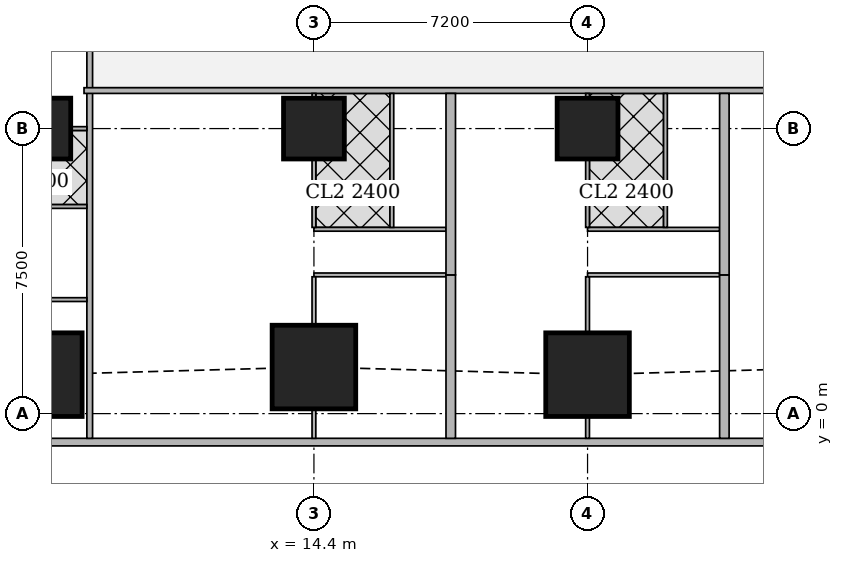
"""IFC4 building model, lengths in metres.
Left out: names, types, materials, properties, quantities, classifications, styles, units other than length and angle.
Written with IfcOpenShell. Run it as: python <this file> out.ifc"""

import sys

from ifc_helpers import new_model, si_unit, direction, frame, frame_2d, origin, origin_2d, place, context, subcontext, project, spatial, rectangle, extrude, element, fill, save


model = new_model("IFC4")
c1 = context("Model", 3, precision=1e-05, world=origin(), true_north=direction((0.0, 1.0)))
c2 = subcontext(c1, "Body", "Model", "MODEL_VIEW")
j1 = project(units=[si_unit("LENGTHUNIT", "METRE"), si_unit("PLANEANGLEUNIT", "RADIAN")], contexts=[c1])
p1 = place(None, origin())
s1 = spatial("IfcSite", under=j1, at=p1, CompositionType="ELEMENT")
p2 = place(p1, origin())
s2 = spatial("IfcBuilding", under=s1, at=p2, CompositionType="ELEMENT")
p3 = place(p2, frame((0.0, 0.0, 89.15)))
s3 = spatial("IfcBuildingStorey", under=s2, at=p3, CompositionType="ELEMENT", Elevation=89.15)
for number, where, z_axis, x_axis in (
    (1, (7.2, 1.025, 0.0), (0.0, 0.0, 1.0), (1.0, 0.0, 0.0)),
    (2, (14.4, 1.225, 0.0), (0.0, 0.0, 1.0), (1.0, 0.0, 0.0)),
    (3, (21.6, 1.025, 0.0), (0.0, 0.0, 1.0), (1.0, 0.0, 0.0)),
):
    element("IfcColumn", number, at=place(p3, frame(where, z_axis=z_axis, x_axis=x_axis)), inside=s3, PredefinedType="COLUMN", context=c2, shape_type="SweptSolid", body=[
        extrude(rectangle(XDim=2.2, YDim=2.2, at=origin_2d()), origin(), (0.0, 0.0, 1.0), 3.75),
    ])
for number, where, z_axis, x_axis in (
    (4, (7.2, 7.5, 0.0), (0.0, 0.0, 1.0), (1.0, 0.0, 0.0)),
    (5, (14.4, 7.5, 0.0), (0.0, 0.0, 1.0), (1.0, 0.0, 0.0)),
    (6, (21.6, 7.5, 0.0), (0.0, 0.0, 1.0), (1.0, 0.0, 0.0)),
):
    element("IfcColumn", number, at=place(p3, frame(where, z_axis=z_axis, x_axis=x_axis)), inside=s3, PredefinedType="COLUMN", context=c2, shape_type="SweptSolid", body=[
        extrude(rectangle(XDim=1.6, YDim=1.6, at=origin_2d()), origin(), (0.0, 0.0, 1.0), 3.75),
    ])
p4 = place(p3, frame((2.163, -0.75, 0.0), z_axis=(0.0, 0.0, 1.0), x_axis=(1.0, 0.0, 0.0)))
e7 = element("IfcWall", 7, at=p4, inside=s3, PredefinedType="SOLIDWALL", context=c2, shape_type="SweptSolid", body=[
    extrude(rectangle(XDim=45.628, YDim=0.2, at=frame_2d((22.814, 0.0))), origin(), (0.0, 0.0, 1.0), 3.5),
])
p5 = place(p4, frame((9.537, 0.0, 0.9)))
e8 = element("IfcOpeningElement", 8, at=p5, cuts=e7, PredefinedType="OPENING", context=c2, shape_type="SweptSolid", body=[
    extrude(rectangle(XDim=1.8, YDim=1.5, at=frame_2d((0.9, 0.75))), frame((0.0, 0.11, 0.0), z_axis=(0.0, -1.0, 0.0), x_axis=(1.0, 0.0, 0.0)), (0.0, 0.0, 1.0), 0.22),
])
p6 = place(p4, frame((13.137, 0.0, 0.9)))
e9 = element("IfcOpeningElement", 9, at=p6, cuts=e7, PredefinedType="OPENING", context=c2, shape_type="SweptSolid", body=[
    extrude(rectangle(XDim=1.8, YDim=1.5, at=frame_2d((0.9, 0.75))), frame((0.0, 0.11, 0.0), z_axis=(0.0, -1.0, 0.0), x_axis=(1.0, 0.0, 0.0)), (0.0, 0.0, 1.0), 0.22),
])
p7 = place(p4, frame((16.737, 0.0, 0.9)))
e10 = element("IfcOpeningElement", 10, at=p7, cuts=e7, PredefinedType="OPENING", context=c2, shape_type="SweptSolid", body=[
    extrude(rectangle(XDim=1.8, YDim=1.5, at=frame_2d((0.9, 0.75))), frame((0.0, 0.11, 0.0), z_axis=(0.0, -1.0, 0.0), x_axis=(1.0, 0.0, 0.0)), (0.0, 0.0, 1.0), 0.22),
])
p8 = place(p4, frame((20.337, 0.0, 0.9)))
e11 = element("IfcOpeningElement", 11, at=p8, cuts=e7, PredefinedType="OPENING", context=c2, shape_type="SweptSolid", body=[
    extrude(rectangle(XDim=1.8, YDim=1.5, at=frame_2d((0.9, 0.75))), frame((0.0, 0.11, 0.0), z_axis=(0.0, -1.0, 0.0), x_axis=(1.0, 0.0, 0.0)), (0.0, 0.0, 1.0), 0.22),
])
p9 = place(p4, frame((23.937, 0.0, 0.9)))
e12 = element("IfcOpeningElement", 12, at=p9, cuts=e7, PredefinedType="OPENING", context=c2, shape_type="SweptSolid", body=[
    extrude(rectangle(XDim=1.8, YDim=1.5, at=frame_2d((0.9, 0.75))), frame((0.0, 0.11, 0.0), z_axis=(0.0, -1.0, 0.0), x_axis=(1.0, 0.0, 0.0)), (0.0, 0.0, 1.0), 0.22),
])
p10 = place(p4, frame((27.537, 0.0, 0.9)))
e13 = element("IfcOpeningElement", 13, at=p10, cuts=e7, PredefinedType="OPENING", context=c2, shape_type="SweptSolid", body=[
    extrude(rectangle(XDim=1.8, YDim=1.5, at=frame_2d((0.9, 0.75))), frame((0.0, 0.11, 0.0), z_axis=(0.0, -1.0, 0.0), x_axis=(1.0, 0.0, 0.0)), (0.0, 0.0, 1.0), 0.22),
])
p11 = place(p4, frame((31.137, 0.0, 0.9)))
e14 = element("IfcOpeningElement", 14, at=p11, cuts=e7, PredefinedType="OPENING", context=c2, shape_type="SweptSolid", body=[
    extrude(rectangle(XDim=1.8, YDim=1.5, at=frame_2d((0.9, 0.75))), frame((0.0, 0.11, 0.0), z_axis=(0.0, -1.0, 0.0), x_axis=(1.0, 0.0, 0.0)), (0.0, 0.0, 1.0), 0.22),
])
p12 = place(p4, frame((34.737, 0.0, 0.9)))
e15 = element("IfcOpeningElement", 15, at=p12, cuts=e7, PredefinedType="OPENING", context=c2, shape_type="SweptSolid", body=[
    extrude(rectangle(XDim=1.8, YDim=1.5, at=frame_2d((0.9, 0.75))), frame((0.0, 0.11, 0.0), z_axis=(0.0, -1.0, 0.0), x_axis=(1.0, 0.0, 0.0)), (0.0, 0.0, 1.0), 0.22),
])
p13 = place(p3, frame((8.5, -0.65, 0.0), z_axis=(0.0, 0.0, 1.0), x_axis=(0.0, 1.0, 0.0)))
e16 = element("IfcWall", 16, at=p13, inside=s3, PredefinedType="SOLIDWALL", context=c2, shape_type="SweptSolid", body=[
    extrude(rectangle(XDim=46.3, YDim=0.15, at=frame_2d((23.15, 0.0))), origin(), (0.0, 0.0, 1.0), 2.2),
])
p14 = place(p13, frame((9.525, 0.0, 0.0)))
e17 = element("IfcOpeningElement", 17, at=p14, cuts=e16, PredefinedType="OPENING", context=c2, shape_type="SweptSolid", body=[
    extrude(rectangle(XDim=1.0, YDim=2.1, at=frame_2d((0.5, 1.05))), frame((0.0, 0.085, 0.0), z_axis=(0.0, -1.0, 0.0), x_axis=(1.0, 0.0, 0.0)), (0.0, 0.0, 1.0), 0.17),
])
p15 = place(p13, frame((13.275, 0.0, 0.0)))
e18 = element("IfcOpeningElement", 18, at=p15, cuts=e16, PredefinedType="OPENING", context=c2, shape_type="SweptSolid", body=[
    extrude(rectangle(XDim=1.0, YDim=2.1, at=frame_2d((0.5, 1.05))), frame((0.0, 0.085, 0.0), z_axis=(0.0, -1.0, 0.0), x_axis=(1.0, 0.0, 0.0)), (0.0, 0.0, 1.0), 0.17),
])
p16 = place(p13, frame((20.775, 0.0, 0.0)))
e19 = element("IfcOpeningElement", 19, at=p16, cuts=e16, PredefinedType="OPENING", context=c2, shape_type="SweptSolid", body=[
    extrude(rectangle(XDim=1.0, YDim=2.1, at=frame_2d((0.5, 1.05))), frame((0.0, 0.085, 0.0), z_axis=(0.0, -1.0, 0.0), x_axis=(1.0, 0.0, 0.0)), (0.0, 0.0, 1.0), 0.17),
])
p17 = place(p13, frame((32.025, 0.0, 0.0)))
e20 = element("IfcOpeningElement", 20, at=p17, cuts=e16, PredefinedType="OPENING", context=c2, shape_type="SweptSolid", body=[
    extrude(rectangle(XDim=1.0, YDim=2.1, at=frame_2d((0.5, 1.05))), frame((0.0, 0.085, 0.0), z_axis=(0.0, -1.0, 0.0), x_axis=(1.0, 0.0, 0.0)), (0.0, 0.0, 1.0), 0.17),
])
p18 = place(p3, frame((40.053, 8.5, 0.0), z_axis=(0.0, 0.0, 1.0), x_axis=(-1.0, 0.0, 0.0)))
e21 = element("IfcWall", 21, at=p18, inside=s3, PredefinedType="SOLIDWALL", context=c2, shape_type="SweptSolid", body=[
    extrude(rectangle(XDim=31.703, YDim=0.15, at=frame_2d((15.852, 0.0))), origin(), (0.0, 0.0, 1.0), 3.5),
])
p19 = place(p18, frame((28.103, 0.0, 0.0)))
e22 = element("IfcOpeningElement", 22, at=p19, cuts=e21, PredefinedType="OPENING", context=c2, shape_type="SweptSolid", body=[
    extrude(rectangle(XDim=1.0, YDim=2.1, at=frame_2d((0.5, 1.05))), frame((0.0, 0.085, 0.0), z_axis=(0.0, -1.0, 0.0), x_axis=(1.0, 0.0, 0.0)), (0.0, 0.0, 1.0), 0.17),
])
p20 = place(p18, frame((19.953, 0.0, 0.0)))
e23 = element("IfcOpeningElement", 23, at=p20, cuts=e21, PredefinedType="OPENING", context=c2, shape_type="SweptSolid", body=[
    extrude(rectangle(XDim=1.0, YDim=2.1, at=frame_2d((0.5, 1.05))), frame((0.0, 0.085, 0.0), z_axis=(0.0, -1.0, 0.0), x_axis=(1.0, 0.0, 0.0)), (0.0, 0.0, 1.0), 0.17),
])
p21 = place(p18, frame((12.753, 0.0, 0.0)))
e24 = element("IfcOpeningElement", 24, at=p21, cuts=e21, PredefinedType="OPENING", context=c2, shape_type="SweptSolid", body=[
    extrude(rectangle(XDim=1.0, YDim=2.1, at=frame_2d((0.5, 1.05))), frame((0.0, 0.085, 0.0), z_axis=(0.0, -1.0, 0.0), x_axis=(1.0, 0.0, 0.0)), (0.0, 0.0, 1.0), 0.17),
])
p22 = place(p18, frame((0.15, 0.0, 0.0)))
e25 = element("IfcOpeningElement", 25, at=p22, cuts=e21, PredefinedType="OPENING", context=c2, shape_type="SweptSolid", body=[
    extrude(rectangle(XDim=1.0, YDim=2.1, at=frame_2d((0.5, 1.05))), frame((0.0, 0.085, 0.0), z_axis=(0.0, -1.0, 0.0), x_axis=(1.0, 0.0, 0.0)), (0.0, 0.0, 1.0), 0.17),
])
p23 = place(p3, frame((8.001, 7.5, 0.0), z_axis=(0.0, 0.0, 1.0), x_axis=(1.0, 0.0, 0.0)))
e26 = element("IfcWall", 26, at=p23, inside=s3, PredefinedType="PARTITIONING", context=c2, shape_type="SweptSolid", body=[
    extrude(rectangle(XDim=0.424, YDim=0.1, at=frame_2d((0.212, 0.0))), origin(), (0.0, 0.0, 1.0), 3.5),
])
p24 = place(p3, frame((4.9, 5.45, 0.0), z_axis=(0.0, 0.0, 1.0), x_axis=(1.0, 0.0, 0.0)))
e27 = element("IfcWall", 27, at=p24, inside=s3, PredefinedType="PARTITIONING", context=c2, shape_type="SweptSolid", body=[
    extrude(rectangle(XDim=3.525, YDim=0.1, at=frame_2d((1.763, 0.0))), origin(), (0.0, 0.0, 1.0), 3.5),
])
p25 = place(p3, frame((17.875, 3.65, 0.0), z_axis=(0.0, 0.0, 1.0), x_axis=(-1.0, 0.0, 0.0)))
e28 = element("IfcWall", 28, at=p25, inside=s3, PredefinedType="PARTITIONING", context=c2, shape_type="SweptSolid", body=[
    extrude(rectangle(XDim=3.475, YDim=0.1, at=frame_2d((1.738, 0.0))), origin(), (0.0, 0.0, 1.0), 3.5),
])
p26 = place(p25, frame((2.375, 0.0, 0.0)))
e29 = element("IfcOpeningElement", 29, at=p26, cuts=e28, PredefinedType="OPENING", context=c2, shape_type="SweptSolid", body=[
    extrude(rectangle(XDim=0.9, YDim=2.1, at=frame_2d((0.45, 1.05))), frame((0.0, 0.06, 0.0), z_axis=(0.0, -1.0, 0.0), x_axis=(1.0, 0.0, 0.0)), (0.0, 0.0, 1.0), 0.12),
])
p27 = place(p3, frame((17.875, 4.85, 0.0), z_axis=(0.0, 0.0, 1.0), x_axis=(-1.0, 0.0, 0.0)))
e30 = element("IfcWall", 30, at=p27, inside=s3, PredefinedType="PARTITIONING", context=c2, shape_type="SweptSolid", body=[
    extrude(rectangle(XDim=3.475, YDim=0.1, at=frame_2d((1.738, 0.0))), origin(), (0.0, 0.0, 1.0), 3.5),
])
p28 = place(p27, frame((2.0, 0.0, 0.0)))
e31 = element("IfcOpeningElement", 31, at=p28, cuts=e30, PredefinedType="OPENING", context=c2, shape_type="SweptSolid", body=[
    extrude(rectangle(XDim=0.9, YDim=2.1, at=frame_2d((0.45, 1.05))), frame((0.0, 0.06, 0.0), z_axis=(0.0, -1.0, 0.0), x_axis=(1.0, 0.0, 0.0)), (0.0, 0.0, 1.0), 0.12),
])
p29 = place(p27, frame((0.2, 0.0, 0.0)))
e32 = element("IfcOpeningElement", 32, at=p29, cuts=e30, PredefinedType="OPENING", context=c2, shape_type="SweptSolid", body=[
    extrude(rectangle(XDim=0.9, YDim=2.1, at=frame_2d((0.45, 1.05))), frame((0.0, 0.06, 0.0), z_axis=(0.0, -1.0, 0.0), x_axis=(1.0, 0.0, 0.0)), (0.0, 0.0, 1.0), 0.12),
])
p30 = place(p3, frame((14.4, -0.65, 0.0), z_axis=(0.0, 0.0, 1.0), x_axis=(0.0, 1.0, 0.0)))
e33 = element("IfcWall", 33, at=p30, inside=s3, PredefinedType="PARTITIONING", context=c2, shape_type="SweptSolid", body=[
    extrude(rectangle(XDim=0.774, YDim=0.1, at=frame_2d((0.387, 0.0))), origin(), (0.0, 0.0, 1.0), 3.5),
])
p31 = place(p3, frame((14.4, 2.326, 0.0), z_axis=(0.0, 0.0, 1.0), x_axis=(0.0, 1.0, 0.0)))
e34 = element("IfcWall", 34, at=p31, inside=s3, PredefinedType="PARTITIONING", context=c2, shape_type="SweptSolid", body=[
    extrude(rectangle(XDim=1.274, YDim=0.1, at=frame_2d((0.637, 0.0))), origin(), (0.0, 0.0, 1.0), 3.5),
])
p32 = place(p3, frame((14.4, 4.9, 0.0), z_axis=(0.0, 0.0, 1.0), x_axis=(0.0, 1.0, 0.0)))
e35 = element("IfcWall", 35, at=p32, inside=s3, PredefinedType="PARTITIONING", context=c2, shape_type="SweptSolid", body=[
    extrude(rectangle(XDim=1.799, YDim=0.1, at=frame_2d((0.899, 0.0))), origin(), (0.0, 0.0, 1.0), 3.5),
])
p33 = place(p3, frame((14.4, 8.301, 0.0), z_axis=(0.0, 0.0, 1.0), x_axis=(0.0, 1.0, 0.0)))
e36 = element("IfcWall", 36, at=p33, inside=s3, PredefinedType="PARTITIONING", context=c2, shape_type="SweptSolid", body=[
    extrude(rectangle(XDim=0.124, YDim=0.1, at=frame_2d((0.062, 0.0))), origin(), (0.0, 0.0, 1.0), 3.5),
])
p34 = place(p3, frame((16.45, 4.9, 0.0), z_axis=(0.0, 0.0, 1.0), x_axis=(0.0, 1.0, 0.0)))
e37 = element("IfcWall", 37, at=p34, inside=s3, PredefinedType="PARTITIONING", context=c2, shape_type="SweptSolid", body=[
    extrude(rectangle(XDim=3.525, YDim=0.1, at=frame_2d((1.763, 0.0))), origin(), (0.0, 0.0, 1.0), 3.5),
])
p35 = place(p3, frame((25.075, 3.65, 0.0), z_axis=(0.0, 0.0, 1.0), x_axis=(-1.0, 0.0, 0.0)))
e38 = element("IfcWall", 38, at=p35, inside=s3, PredefinedType="PARTITIONING", context=c2, shape_type="SweptSolid", body=[
    extrude(rectangle(XDim=3.475, YDim=0.1, at=frame_2d((1.737, 0.0))), origin(), (0.0, 0.0, 1.0), 3.5),
])
p36 = place(p35, frame((2.375, 0.0, 0.0)))
e39 = element("IfcOpeningElement", 39, at=p36, cuts=e38, PredefinedType="OPENING", context=c2, shape_type="SweptSolid", body=[
    extrude(rectangle(XDim=0.9, YDim=2.1, at=frame_2d((0.45, 1.05))), frame((0.0, 0.06, 0.0), z_axis=(0.0, -1.0, 0.0), x_axis=(1.0, 0.0, 0.0)), (0.0, 0.0, 1.0), 0.12),
])
p37 = place(p3, frame((25.075, 4.85, 0.0), z_axis=(0.0, 0.0, 1.0), x_axis=(-1.0, 0.0, 0.0)))
e40 = element("IfcWall", 40, at=p37, inside=s3, PredefinedType="PARTITIONING", context=c2, shape_type="SweptSolid", body=[
    extrude(rectangle(XDim=3.475, YDim=0.1, at=frame_2d((1.737, 0.0))), origin(), (0.0, 0.0, 1.0), 3.5),
])
p38 = place(p37, frame((2.0, 0.0, 0.0)))
e41 = element("IfcOpeningElement", 41, at=p38, cuts=e40, PredefinedType="OPENING", context=c2, shape_type="SweptSolid", body=[
    extrude(rectangle(XDim=0.9, YDim=2.1, at=frame_2d((0.45, 1.05))), frame((0.0, 0.06, 0.0), z_axis=(0.0, -1.0, 0.0), x_axis=(1.0, 0.0, 0.0)), (0.0, 0.0, 1.0), 0.12),
])
p39 = place(p37, frame((0.2, 0.0, 0.0)))
e42 = element("IfcOpeningElement", 42, at=p39, cuts=e40, PredefinedType="OPENING", context=c2, shape_type="SweptSolid", body=[
    extrude(rectangle(XDim=0.9, YDim=2.1, at=frame_2d((0.45, 1.05))), frame((0.0, 0.06, 0.0), z_axis=(0.0, -1.0, 0.0), x_axis=(1.0, 0.0, 0.0)), (0.0, 0.0, 1.0), 0.12),
])
p40 = place(p3, frame((21.6, -0.65, 0.0), z_axis=(0.0, 0.0, 1.0), x_axis=(0.0, 1.0, 0.0)))
e43 = element("IfcWall", 43, at=p40, inside=s3, PredefinedType="PARTITIONING", context=c2, shape_type="SweptSolid", body=[
    extrude(rectangle(XDim=0.574, YDim=0.1, at=frame_2d((0.287, 0.0))), origin(), (0.0, 0.0, 1.0), 3.5),
])
p41 = place(p3, frame((21.6, 2.126, 0.0), z_axis=(0.0, 0.0, 1.0), x_axis=(0.0, 1.0, 0.0)))
e44 = element("IfcWall", 44, at=p41, inside=s3, PredefinedType="PARTITIONING", context=c2, shape_type="SweptSolid", body=[
    extrude(rectangle(XDim=1.474, YDim=0.1, at=frame_2d((0.737, 0.0))), origin(), (0.0, 0.0, 1.0), 3.5),
])
p42 = place(p3, frame((21.6, 4.9, 0.0), z_axis=(0.0, 0.0, 1.0), x_axis=(0.0, 1.0, 0.0)))
e45 = element("IfcWall", 45, at=p42, inside=s3, PredefinedType="PARTITIONING", context=c2, shape_type="SweptSolid", body=[
    extrude(rectangle(XDim=1.799, YDim=0.1, at=frame_2d((0.899, 0.0))), origin(), (0.0, 0.0, 1.0), 3.5),
])
p43 = place(p3, frame((21.6, 8.301, 0.0), z_axis=(0.0, 0.0, 1.0), x_axis=(0.0, 1.0, 0.0)))
e46 = element("IfcWall", 46, at=p43, inside=s3, PredefinedType="PARTITIONING", context=c2, shape_type="SweptSolid", body=[
    extrude(rectangle(XDim=0.124, YDim=0.1, at=frame_2d((0.062, 0.0))), origin(), (0.0, 0.0, 1.0), 3.5),
])
p44 = place(p3, frame((23.65, 4.9, 0.0), z_axis=(0.0, 0.0, 1.0), x_axis=(0.0, 1.0, 0.0)))
e47 = element("IfcWall", 47, at=p44, inside=s3, PredefinedType="PARTITIONING", context=c2, shape_type="SweptSolid", body=[
    extrude(rectangle(XDim=3.525, YDim=0.1, at=frame_2d((1.763, 0.0))), origin(), (0.0, 0.0, 1.0), 3.5),
])
p45 = place(p3, frame((18.0, -0.65, 0.0), z_axis=(0.0, 0.0, 1.0), x_axis=(0.0, 1.0, 0.0)))
e48 = element("IfcWall", 48, at=p45, inside=s3, PredefinedType="SOLIDWALL", context=c2, shape_type="SweptSolid", body=[
    extrude(rectangle(XDim=4.3, YDim=0.25, at=frame_2d((2.15, 0.0))), origin(), (0.0, 0.0, 1.0), 2.2),
])
p46 = place(p3, frame((18.0, 3.65, 0.0), z_axis=(0.0, 0.0, 1.0), x_axis=(0.0, 1.0, 0.0)))
e49 = element("IfcWall", 49, at=p46, inside=s3, PredefinedType="SOLIDWALL", context=c2, shape_type="SweptSolid", body=[
    extrude(rectangle(XDim=4.775, YDim=0.25, at=frame_2d((2.388, 0.0))), origin(), (0.0, 0.0, 1.0), 3.5),
])
p47 = place(p3, frame((25.2, -0.65, 0.0), z_axis=(0.0, 0.0, 1.0), x_axis=(0.0, 1.0, 0.0)))
e50 = element("IfcWall", 50, at=p47, inside=s3, PredefinedType="SOLIDWALL", context=c2, shape_type="SweptSolid", body=[
    extrude(rectangle(XDim=4.3, YDim=0.25, at=frame_2d((2.15, 0.0))), origin(), (0.0, 0.0, 1.0), 2.2),
])
p48 = place(p3, frame((25.2, 3.65, 0.0), z_axis=(0.0, 0.0, 1.0), x_axis=(0.0, 1.0, 0.0)))
e51 = element("IfcWall", 51, at=p48, inside=s3, PredefinedType="SOLIDWALL", context=c2, shape_type="SweptSolid", body=[
    extrude(rectangle(XDim=4.775, YDim=0.25, at=frame_2d((2.388, 0.0))), origin(), (0.0, 0.0, 1.0), 3.5),
])
p49 = place(p3, frame((8.425, 3.0, 0.0), z_axis=(0.0, 0.0, 1.0), x_axis=(-1.0, 0.0, 0.0)))
e52 = element("IfcWall", 52, at=p49, inside=s3, PredefinedType="PARTITIONING", context=c2, shape_type="SweptSolid", body=[
    extrude(rectangle(XDim=3.525, YDim=0.1, at=frame_2d((1.763, 0.0))), origin(), (0.0, 0.0, 1.0), 3.5),
])
p50 = place(p49, frame((2.35, 0.0, 0.0)))
e53 = element("IfcOpeningElement", 53, at=p50, cuts=e52, PredefinedType="OPENING", context=c2, shape_type="SweptSolid", body=[
    extrude(rectangle(XDim=0.9, YDim=2.1, at=frame_2d((0.45, 1.05))), frame((0.0, 0.06, 0.0), z_axis=(0.0, -1.0, 0.0), x_axis=(1.0, 0.0, 0.0)), (0.0, 0.0, 1.0), 0.12),
])
p51 = place(p5, origin())
e54 = element("IfcWindow", 54, at=p51, inside=s3, PartitioningType="SINGLE_PANEL", PredefinedType="WINDOW", context=c2, shape_type="SweptSolid", body=[
    extrude(rectangle(XDim=1.8, YDim=1.5, at=frame_2d((0.9, 0.75))), frame((0.0, 0.03, 0.0), z_axis=(0.0, -1.0, 0.0), x_axis=(1.0, 0.0, 0.0)), (0.0, 0.0, 1.0), 0.06),
])
fill(e8, e54)
p52 = place(p6, origin())
e55 = element("IfcWindow", 55, at=p52, inside=s3, PartitioningType="SINGLE_PANEL", PredefinedType="WINDOW", context=c2, shape_type="SweptSolid", body=[
    extrude(rectangle(XDim=1.8, YDim=1.5, at=frame_2d((0.9, 0.75))), frame((0.0, 0.03, 0.0), z_axis=(0.0, -1.0, 0.0), x_axis=(1.0, 0.0, 0.0)), (0.0, 0.0, 1.0), 0.06),
])
fill(e9, e55)
p53 = place(p7, origin())
e56 = element("IfcWindow", 56, at=p53, inside=s3, PartitioningType="SINGLE_PANEL", PredefinedType="WINDOW", context=c2, shape_type="SweptSolid", body=[
    extrude(rectangle(XDim=1.8, YDim=1.5, at=frame_2d((0.9, 0.75))), frame((0.0, 0.03, 0.0), z_axis=(0.0, -1.0, 0.0), x_axis=(1.0, 0.0, 0.0)), (0.0, 0.0, 1.0), 0.06),
])
fill(e10, e56)
p54 = place(p8, origin())
e57 = element("IfcWindow", 57, at=p54, inside=s3, PartitioningType="SINGLE_PANEL", PredefinedType="WINDOW", context=c2, shape_type="SweptSolid", body=[
    extrude(rectangle(XDim=1.8, YDim=1.5, at=frame_2d((0.9, 0.75))), frame((0.0, 0.03, 0.0), z_axis=(0.0, -1.0, 0.0), x_axis=(1.0, 0.0, 0.0)), (0.0, 0.0, 1.0), 0.06),
])
fill(e11, e57)
p55 = place(p9, origin())
e58 = element("IfcWindow", 58, at=p55, inside=s3, PartitioningType="SINGLE_PANEL", PredefinedType="WINDOW", context=c2, shape_type="SweptSolid", body=[
    extrude(rectangle(XDim=1.8, YDim=1.5, at=frame_2d((0.9, 0.75))), frame((0.0, 0.03, 0.0), z_axis=(0.0, -1.0, 0.0), x_axis=(1.0, 0.0, 0.0)), (0.0, 0.0, 1.0), 0.06),
])
fill(e12, e58)
p56 = place(p14, origin())
e59 = element("IfcDoor", 59, at=p56, inside=s3, OperationType="SINGLE_SWING_LEFT", PredefinedType="DOOR", context=c2, shape_type="SweptSolid", body=[
    extrude(rectangle(XDim=1.0, YDim=2.1, at=frame_2d((0.5, 1.05))), frame((0.0, 0.025, 0.0), z_axis=(0.0, -1.0, 0.0), x_axis=(1.0, 0.0, 0.0)), (0.0, 0.0, 1.0), 0.05),
])
fill(e17, e59)
p57 = place(p26, origin())
e60 = element("IfcDoor", 60, at=p57, inside=s3, OperationType="SINGLE_SWING_RIGHT", PredefinedType="DOOR", context=c2, shape_type="SweptSolid", body=[
    extrude(rectangle(XDim=0.9, YDim=2.1, at=frame_2d((0.45, 1.05))), frame((0.0, 0.025, 0.0), z_axis=(0.0, -1.0, 0.0), x_axis=(1.0, 0.0, 0.0)), (0.0, 0.0, 1.0), 0.05),
])
fill(e29, e60)
p58 = place(p28, origin())
e61 = element("IfcDoor", 61, at=p58, inside=s3, OperationType="SINGLE_SWING_LEFT", PredefinedType="DOOR", context=c2, shape_type="SweptSolid", body=[
    extrude(rectangle(XDim=0.9, YDim=2.1, at=frame_2d((0.45, 1.05))), frame((0.0, 0.025, 0.0), z_axis=(0.0, -1.0, 0.0), x_axis=(1.0, 0.0, 0.0)), (0.0, 0.0, 1.0), 0.05),
])
fill(e31, e61)
p59 = place(p29, origin())
e62 = element("IfcDoor", 62, at=p59, inside=s3, OperationType="SINGLE_SWING_RIGHT", PredefinedType="DOOR", context=c2, shape_type="SweptSolid", body=[
    extrude(rectangle(XDim=0.9, YDim=2.1, at=frame_2d((0.45, 1.05))), frame((0.0, 0.025, 0.0), z_axis=(0.0, -1.0, 0.0), x_axis=(1.0, 0.0, 0.0)), (0.0, 0.0, 1.0), 0.05),
])
fill(e32, e62)
p60 = place(p19, origin())
e63 = element("IfcDoor", 63, at=p60, inside=s3, OperationType="SINGLE_SWING_RIGHT", PredefinedType="DOOR", context=c2, shape_type="SweptSolid", body=[
    extrude(rectangle(XDim=1.0, YDim=2.1, at=frame_2d((0.5, 1.05))), frame((0.0, 0.025, 0.0), z_axis=(0.0, -1.0, 0.0), x_axis=(1.0, 0.0, 0.0)), (0.0, 0.0, 1.0), 0.05),
])
fill(e22, e63)
p61 = place(p36, origin())
e64 = element("IfcDoor", 64, at=p61, inside=s3, OperationType="SINGLE_SWING_RIGHT", PredefinedType="DOOR", context=c2, shape_type="SweptSolid", body=[
    extrude(rectangle(XDim=0.9, YDim=2.1, at=frame_2d((0.45, 1.05))), frame((0.0, 0.025, 0.0), z_axis=(0.0, -1.0, 0.0), x_axis=(1.0, 0.0, 0.0)), (0.0, 0.0, 1.0), 0.05),
])
fill(e39, e64)
p62 = place(p38, origin())
e65 = element("IfcDoor", 65, at=p62, inside=s3, OperationType="SINGLE_SWING_LEFT", PredefinedType="DOOR", context=c2, shape_type="SweptSolid", body=[
    extrude(rectangle(XDim=0.9, YDim=2.1, at=frame_2d((0.45, 1.05))), frame((0.0, 0.025, 0.0), z_axis=(0.0, -1.0, 0.0), x_axis=(1.0, 0.0, 0.0)), (0.0, 0.0, 1.0), 0.05),
])
fill(e41, e65)
p63 = place(p39, origin())
e66 = element("IfcDoor", 66, at=p63, inside=s3, OperationType="SINGLE_SWING_RIGHT", PredefinedType="DOOR", context=c2, shape_type="SweptSolid", body=[
    extrude(rectangle(XDim=0.9, YDim=2.1, at=frame_2d((0.45, 1.05))), frame((0.0, 0.025, 0.0), z_axis=(0.0, -1.0, 0.0), x_axis=(1.0, 0.0, 0.0)), (0.0, 0.0, 1.0), 0.05),
])
fill(e42, e66)
p64 = place(p20, origin())
e67 = element("IfcDoor", 67, at=p64, inside=s3, OperationType="SINGLE_SWING_RIGHT", PredefinedType="DOOR", context=c2, shape_type="SweptSolid", body=[
    extrude(rectangle(XDim=1.0, YDim=2.1, at=frame_2d((0.5, 1.05))), frame((0.0, 0.025, 0.0), z_axis=(0.0, -1.0, 0.0), x_axis=(1.0, 0.0, 0.0)), (0.0, 0.0, 1.0), 0.05),
])
fill(e23, e67)
save(model, sys.argv[1])
